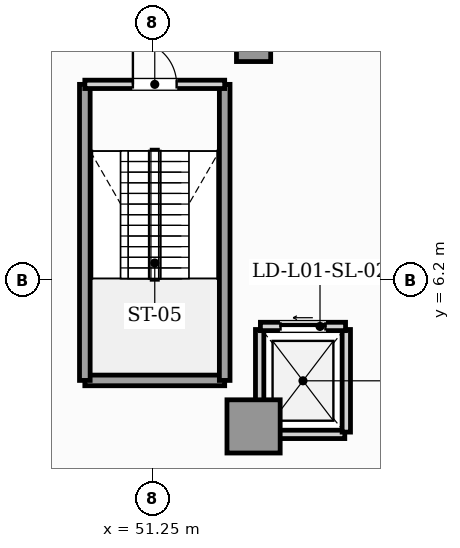
"""IFC4 building model, lengths in metres.
Left out: names, types, materials, properties, quantities, classifications, styles, units other than length and angle.
Written with IfcOpenShell. Run it as: python <this file> out.ifc"""

import sys

from ifc_helpers import new_model, si_unit, direction, frame, frame_2d, origin, origin_2d, place, context, subcontext, project, spatial, rectangle, hollow_rectangle, extrude, element, fill, save


model = new_model("IFC4")
c1 = context("Model", 3, precision=1e-05, world=origin(), true_north=direction((0.0, 1.0)))
c2 = subcontext(c1, "Body", "Model", "MODEL_VIEW")
j1 = project(units=[si_unit("LENGTHUNIT", "METRE"), si_unit("PLANEANGLEUNIT", "RADIAN")], contexts=[c1])
p1 = place(None, origin())
s1 = spatial("IfcSite", under=j1, at=p1, CompositionType="ELEMENT")
p2 = place(p1, origin())
s2 = spatial("IfcBuilding", under=s1, at=p2, CompositionType="ELEMENT")
p3 = place(p2, frame((0.0, 0.0, 5.4)))
s3 = spatial("IfcBuildingStorey", under=s2, at=p3, CompositionType="ELEMENT", Elevation=5.4)
p4 = place(p3, frame((53.9, 2.35, 0.0), z_axis=(0.0, 0.0, 1.0), x_axis=(1.0, 0.0, 0.0)))
e1 = element("IfcColumn", 1, at=p4, inside=s3, PredefinedType="USERDEFINED", context=c2, shape_type="SweptSolid", body=[
    extrude(hollow_rectangle(XDim=1.4, YDim=1.4, WallThickness=0.08, at=origin_2d()), origin(), (0.0, 0.0, 1.0), 4.8),
])
p5 = place(p3, frame((53.9, 12.4, 0.0), z_axis=(0.0, 0.0, 1.0), x_axis=(1.0, 0.0, 0.0)))
e2 = element("IfcColumn", 2, at=p5, inside=s3, PredefinedType="COLUMN", context=c2, shape_type="SweptSolid", body=[
    extrude(rectangle(XDim=0.9, YDim=0.9, at=origin_2d()), origin(), (0.0, 0.0, 1.0), 4.8),
])
p6 = place(p3, frame((54.1, 2.14, 0.0), z_axis=(0.0, 0.0, 1.0), x_axis=(1.0, 0.0, 0.0)))
e3 = element("IfcWall", 3, at=p6, inside=s3, PredefinedType="SOLIDWALL", context=c2, shape_type="SweptSolid", body=[
    extrude(rectangle(XDim=2.2, YDim=0.22, at=frame_2d((1.1, 0.0))), origin(), (0.0, 0.0, 1.0), 4.5),
])
p7 = place(p3, frame((54.06, 2.2, 0.0), z_axis=(0.0, 0.0, 1.0), x_axis=(0.0, 1.0, 0.0)))
e4 = element("IfcWall", 4, at=p7, inside=s3, PredefinedType="SOLIDWALL", context=c2, shape_type="SweptSolid", body=[
    extrude(rectangle(XDim=2.7, YDim=0.22, at=frame_2d((1.35, 0.0))), origin(), (0.0, 0.0, 1.0), 3.967),
])
p8 = place(p3, frame((56.34, 2.2, 0.0), z_axis=(0.0, 0.0, 1.0), x_axis=(0.0, 1.0, 0.0)))
e5 = element("IfcWall", 5, at=p8, inside=s3, PredefinedType="SOLIDWALL", context=c2, shape_type="SweptSolid", body=[
    extrude(rectangle(XDim=2.7, YDim=0.22, at=frame_2d((1.35, 0.0))), origin(), (0.0, 0.0, 1.0), 4.5),
])
p9 = place(p3, frame((54.08, 4.98, 0.0), z_axis=(0.0, 0.0, 1.0), x_axis=(1.0, 0.0, 0.0)))
e6 = element("IfcWall", 6, at=p9, inside=s3, PredefinedType="SOLIDWALL", context=c2, shape_type="SweptSolid", body=[
    extrude(rectangle(XDim=2.24, YDim=0.22, at=frame_2d((1.12, 0.0))), origin(), (0.0, 0.0, 1.0), 4.5),
])
p10 = place(p9, frame((0.53, 0.0, 0.0)))
e7 = element("IfcOpeningElement", 7, at=p10, cuts=e6, PredefinedType="OPENING", context=c2, shape_type="SweptSolid", body=[
    extrude(rectangle(XDim=1.18, YDim=2.2, at=frame_2d((0.59, 1.1))), frame((0.0, 0.12, 0.0), z_axis=(0.0, -1.0, 0.0), x_axis=(1.0, 0.0, 0.0)), (0.0, 0.0, 1.0), 0.24),
])
p11 = place(p3, frame((49.46, 3.56, 0.0), z_axis=(0.0, 0.0, 1.0), x_axis=(1.0, 0.0, 0.0)))
e8 = element("IfcWall", 8, at=p11, inside=s3, PredefinedType="SHEAR", context=c2, shape_type="SweptSolid", body=[
    extrude(rectangle(XDim=3.68, YDim=0.28, at=frame_2d((1.84, 0.0))), origin(), (0.0, 0.0, 1.0), 4.5),
])
for number, where, z_axis, x_axis in (
    (9, (49.46, 3.56, 0.0), (0.0, 0.0, 1.0), (0.0, 1.0, 0.0)),
    (10, (53.14, 3.56, 0.0), (0.0, 0.0, 1.0), (0.0, 1.0, 0.0)),
):
    element("IfcWall", number, at=place(p3, frame(where, z_axis=z_axis, x_axis=x_axis)), inside=s3, PredefinedType="SHEAR", context=c2, shape_type="SweptSolid", body=[
        extrude(rectangle(XDim=7.79, YDim=0.28, at=frame_2d((3.895, 0.0))), origin(), (0.0, 0.0, 1.0), 4.5),
    ])
p12 = place(p3, frame((49.46, 11.35, 0.0), z_axis=(0.0, 0.0, 1.0), x_axis=(1.0, 0.0, 0.0)))
e11 = element("IfcWall", 11, at=p12, inside=s3, PredefinedType="SOLIDWALL", context=c2, shape_type="SweptSolid", body=[
    extrude(rectangle(XDim=3.68, YDim=0.22, at=frame_2d((1.84, 0.0))), origin(), (0.0, 0.0, 1.0), 4.5),
])
p13 = place(p12, frame((1.265, 0.0, 0.0)))
e12 = element("IfcOpeningElement", 12, at=p13, cuts=e11, PredefinedType="OPENING", context=c2, shape_type="SweptSolid", body=[
    extrude(rectangle(XDim=1.15, YDim=2.2, at=frame_2d((0.575, 1.1))), frame((0.0, 0.12, 0.0), z_axis=(0.0, -1.0, 0.0), x_axis=(1.0, 0.0, 0.0)), (0.0, 0.0, 1.0), 0.24),
])
p14 = place(p10, origin())
e13 = element("IfcDoor", 13, at=p14, inside=s3, OperationType="SLIDING_TO_LEFT", PredefinedType="DOOR", context=c2, shape_type="SweptSolid", body=[
    extrude(rectangle(XDim=1.18, YDim=2.2, at=frame_2d((0.59, 1.1))), frame((0.0, 0.025, 0.0), z_axis=(0.0, -1.0, 0.0), x_axis=(1.0, 0.0, 0.0)), (0.0, 0.0, 1.0), 0.05),
])
fill(e7, e13)
p15 = place(p13, origin())
e14 = element("IfcDoor", 14, at=p15, inside=s3, OperationType="SINGLE_SWING_LEFT", PredefinedType="DOOR", context=c2, shape_type="SweptSolid", body=[
    extrude(rectangle(XDim=1.15, YDim=2.2, at=frame_2d((0.575, 1.1))), frame((0.0, 0.025, 0.0), z_axis=(0.0, -1.0, 0.0), x_axis=(1.0, 0.0, 0.0)), (0.0, 0.0, 1.0), 0.05),
])
fill(e12, e14)
save(model, sys.argv[1])
